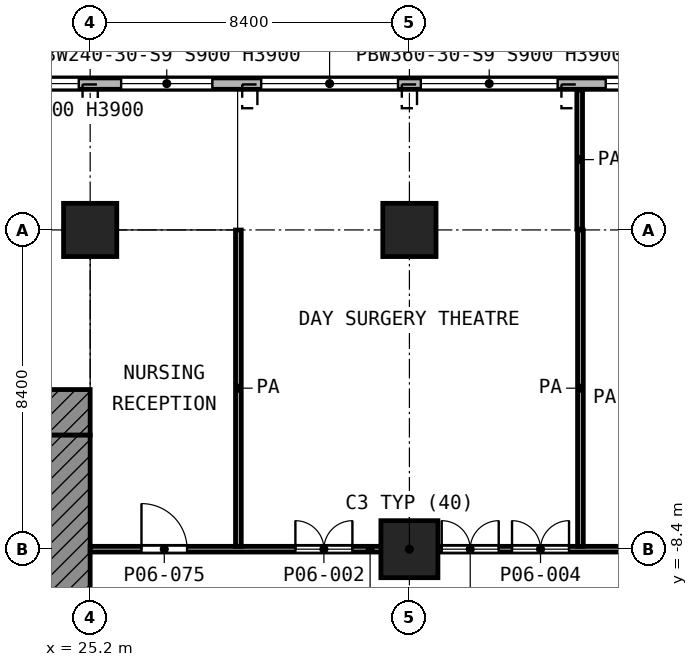
"""IFC4 building model, lengths in metres.
Left out: names, types, materials, properties, quantities, classifications, styles, units other than length and angle.
Written with IfcOpenShell. Run it as: python <this file> out.ifc"""

import sys

from ifc_helpers import new_model, si_unit, direction, frame, frame_2d, origin, origin_2d, place, context, subcontext, project, spatial, rectangle, extrude, element, fill, save


model = new_model("IFC4")
c1 = context("Model", 3, precision=1e-05, world=origin(), true_north=direction((0.0, 1.0)))
c2 = subcontext(c1, "Body", "Model", "MODEL_VIEW")
j1 = project(units=[si_unit("LENGTHUNIT", "METRE"), si_unit("PLANEANGLEUNIT", "RADIAN")], contexts=[c1])
p1 = place(None, origin())
s1 = spatial("IfcSite", under=j1, at=p1, CompositionType="ELEMENT")
p2 = place(p1, origin())
s2 = spatial("IfcBuilding", under=s1, at=p2, CompositionType="ELEMENT")
p3 = place(p2, frame((0.0, 0.0, 29.0)))
s3 = spatial("IfcBuildingStorey", under=s2, at=p3, CompositionType="ELEMENT", Elevation=29.0)
for number, where, z_axis, x_axis in (
    (1, (25.2, 0.0, 0.0), (0.0, 0.0, 1.0), (1.0, 0.0, 0.0)),
    (2, (33.6, 0.0, 0.0), (0.0, 0.0, 1.0), (1.0, 0.0, 0.0)),
):
    element("IfcColumn", number, at=place(p3, frame(where, z_axis=z_axis, x_axis=x_axis)), inside=s3, PredefinedType="COLUMN", context=c2, shape_type="SweptSolid", body=[
        extrude(rectangle(XDim=1.4, YDim=1.4, at=origin_2d()), origin(), (0.0, 0.0, 1.0), 5.2),
    ])
p4 = place(p3, frame((33.6, -8.4, 0.0), z_axis=(0.0, 0.0, 1.0), x_axis=(1.0, 0.0, 0.0)))
e3 = element("IfcColumn", 3, at=p4, inside=s3, PredefinedType="COLUMN", context=c2, shape_type="SweptSolid", body=[
    extrude(rectangle(XDim=1.5, YDim=1.5, at=origin_2d()), origin(), (0.0, 0.0, 1.0), 5.2),
])
p5 = place(p3, frame((90.338, 3.85, 0.0), z_axis=(0.0, 0.0, 1.0), x_axis=(-1.0, 0.0, 0.0)))
e4 = element("IfcWall", 4, at=p5, inside=s3, PredefinedType="SOLIDWALL", context=c2, shape_type="SweptSolid", body=[
    extrude(rectangle(XDim=88.276, YDim=0.3, at=frame_2d((44.138, 0.0))), origin(), (0.0, 0.0, 1.0), 4.7),
])
p6 = place(p5, frame((0.438, 0.0, 0.9)))
e5 = element("IfcOpeningElement", 5, at=p6, cuts=e4, PredefinedType="OPENING", context=c2, shape_type="SweptSolid", body=[
    extrude(rectangle(XDim=1.2, YDim=3.0, at=frame_2d((0.6, 1.5))), frame((0.0, 0.16, 0.0), z_axis=(0.0, -1.0, 0.0), x_axis=(1.0, 0.0, 0.0)), (0.0, 0.0, 1.0), 0.32),
])
p7 = place(p5, frame((2.438, 0.0, 0.9)))
e6 = element("IfcOpeningElement", 6, at=p7, cuts=e4, PredefinedType="OPENING", context=c2, shape_type="SweptSolid", body=[
    extrude(rectangle(XDim=3.6, YDim=3.0, at=frame_2d((1.8, 1.5))), frame((0.0, 0.16, 0.0), z_axis=(0.0, -1.0, 0.0), x_axis=(1.0, 0.0, 0.0)), (0.0, 0.0, 1.0), 0.32),
])
p8 = place(p5, frame((6.638, 0.0, 0.9)))
e7 = element("IfcOpeningElement", 7, at=p8, cuts=e4, PredefinedType="OPENING", context=c2, shape_type="SweptSolid", body=[
    extrude(rectangle(XDim=3.6, YDim=3.0, at=frame_2d((1.8, 1.5))), frame((0.0, 0.16, 0.0), z_axis=(0.0, -1.0, 0.0), x_axis=(1.0, 0.0, 0.0)), (0.0, 0.0, 1.0), 0.32),
])
p9 = place(p5, frame((10.838, 0.0, 0.9)))
e8 = element("IfcOpeningElement", 8, at=p9, cuts=e4, PredefinedType="OPENING", context=c2, shape_type="SweptSolid", body=[
    extrude(rectangle(XDim=3.6, YDim=3.0, at=frame_2d((1.8, 1.5))), frame((0.0, 0.16, 0.0), z_axis=(0.0, -1.0, 0.0), x_axis=(1.0, 0.0, 0.0)), (0.0, 0.0, 1.0), 0.32),
])
p10 = place(p5, frame((15.038, 0.0, 0.9)))
e9 = element("IfcOpeningElement", 9, at=p10, cuts=e4, PredefinedType="OPENING", context=c2, shape_type="SweptSolid", body=[
    extrude(rectangle(XDim=3.6, YDim=3.0, at=frame_2d((1.8, 1.5))), frame((0.0, 0.16, 0.0), z_axis=(0.0, -1.0, 0.0), x_axis=(1.0, 0.0, 0.0)), (0.0, 0.0, 1.0), 0.32),
])
p11 = place(p5, frame((19.923, 0.0, 0.9)))
e10 = element("IfcOpeningElement", 10, at=p11, cuts=e4, PredefinedType="OPENING", context=c2, shape_type="SweptSolid", body=[
    extrude(rectangle(XDim=2.4, YDim=3.0, at=frame_2d((1.2, 1.5))), frame((0.0, 0.16, 0.0), z_axis=(0.0, -1.0, 0.0), x_axis=(1.0, 0.0, 0.0)), (0.0, 0.0, 1.0), 0.32),
])
p12 = place(p5, frame((23.438, 0.0, 0.9)))
e11 = element("IfcOpeningElement", 11, at=p12, cuts=e4, PredefinedType="OPENING", context=c2, shape_type="SweptSolid", body=[
    extrude(rectangle(XDim=3.6, YDim=3.0, at=frame_2d((1.8, 1.5))), frame((0.0, 0.16, 0.0), z_axis=(0.0, -1.0, 0.0), x_axis=(1.0, 0.0, 0.0)), (0.0, 0.0, 1.0), 0.32),
])
p13 = place(p5, frame((27.638, 0.0, 0.9)))
e12 = element("IfcOpeningElement", 12, at=p13, cuts=e4, PredefinedType="OPENING", context=c2, shape_type="SweptSolid", body=[
    extrude(rectangle(XDim=3.6, YDim=3.0, at=frame_2d((1.8, 1.5))), frame((0.0, 0.16, 0.0), z_axis=(0.0, -1.0, 0.0), x_axis=(1.0, 0.0, 0.0)), (0.0, 0.0, 1.0), 0.32),
])
p14 = place(p5, frame((31.838, 0.0, 0.9)))
e13 = element("IfcOpeningElement", 13, at=p14, cuts=e4, PredefinedType="OPENING", context=c2, shape_type="SweptSolid", body=[
    extrude(rectangle(XDim=3.6, YDim=3.0, at=frame_2d((1.8, 1.5))), frame((0.0, 0.16, 0.0), z_axis=(0.0, -1.0, 0.0), x_axis=(1.0, 0.0, 0.0)), (0.0, 0.0, 1.0), 0.32),
])
p15 = place(p5, frame((36.038, 0.0, 0.9)))
e14 = element("IfcOpeningElement", 14, at=p15, cuts=e4, PredefinedType="OPENING", context=c2, shape_type="SweptSolid", body=[
    extrude(rectangle(XDim=3.6, YDim=3.0, at=frame_2d((1.8, 1.5))), frame((0.0, 0.16, 0.0), z_axis=(0.0, -1.0, 0.0), x_axis=(1.0, 0.0, 0.0)), (0.0, 0.0, 1.0), 0.32),
])
p16 = place(p5, frame((40.238, 0.0, 0.9)))
e15 = element("IfcOpeningElement", 15, at=p16, cuts=e4, PredefinedType="OPENING", context=c2, shape_type="SweptSolid", body=[
    extrude(rectangle(XDim=3.6, YDim=3.0, at=frame_2d((1.8, 1.5))), frame((0.0, 0.16, 0.0), z_axis=(0.0, -1.0, 0.0), x_axis=(1.0, 0.0, 0.0)), (0.0, 0.0, 1.0), 0.32),
])
p17 = place(p5, frame((44.773, 0.0, 0.9)))
e16 = element("IfcOpeningElement", 16, at=p17, cuts=e4, PredefinedType="OPENING", context=c2, shape_type="SweptSolid", body=[
    extrude(rectangle(XDim=2.4, YDim=3.0, at=frame_2d((1.2, 1.5))), frame((0.0, 0.16, 0.0), z_axis=(0.0, -1.0, 0.0), x_axis=(1.0, 0.0, 0.0)), (0.0, 0.0, 1.0), 0.32),
])
p18 = place(p5, frame((49.173, 0.0, 0.9)))
e17 = element("IfcOpeningElement", 17, at=p18, cuts=e4, PredefinedType="OPENING", context=c2, shape_type="SweptSolid", body=[
    extrude(rectangle(XDim=2.4, YDim=3.0, at=frame_2d((1.2, 1.5))), frame((0.0, 0.16, 0.0), z_axis=(0.0, -1.0, 0.0), x_axis=(1.0, 0.0, 0.0)), (0.0, 0.0, 1.0), 0.32),
])
p19 = place(p5, frame((52.838, 0.0, 0.9)))
e18 = element("IfcOpeningElement", 18, at=p19, cuts=e4, PredefinedType="OPENING", context=c2, shape_type="SweptSolid", body=[
    extrude(rectangle(XDim=3.6, YDim=3.0, at=frame_2d((1.8, 1.5))), frame((0.0, 0.16, 0.0), z_axis=(0.0, -1.0, 0.0), x_axis=(1.0, 0.0, 0.0)), (0.0, 0.0, 1.0), 0.32),
])
p20 = place(p5, frame((57.038, 0.0, 0.9)))
e19 = element("IfcOpeningElement", 19, at=p20, cuts=e4, PredefinedType="OPENING", context=c2, shape_type="SweptSolid", body=[
    extrude(rectangle(XDim=3.6, YDim=3.0, at=frame_2d((1.8, 1.5))), frame((0.0, 0.16, 0.0), z_axis=(0.0, -1.0, 0.0), x_axis=(1.0, 0.0, 0.0)), (0.0, 0.0, 1.0), 0.32),
])
p21 = place(p5, frame((61.923, 0.0, 0.9)))
e20 = element("IfcOpeningElement", 20, at=p21, cuts=e4, PredefinedType="OPENING", context=c2, shape_type="SweptSolid", body=[
    extrude(rectangle(XDim=2.4, YDim=3.0, at=frame_2d((1.2, 1.5))), frame((0.0, 0.16, 0.0), z_axis=(0.0, -1.0, 0.0), x_axis=(1.0, 0.0, 0.0)), (0.0, 0.0, 1.0), 0.32),
])
p22 = place(p5, frame((65.438, 0.0, 0.9)))
e21 = element("IfcOpeningElement", 21, at=p22, cuts=e4, PredefinedType="OPENING", context=c2, shape_type="SweptSolid", body=[
    extrude(rectangle(XDim=3.6, YDim=3.0, at=frame_2d((1.8, 1.5))), frame((0.0, 0.16, 0.0), z_axis=(0.0, -1.0, 0.0), x_axis=(1.0, 0.0, 0.0)), (0.0, 0.0, 1.0), 0.32),
])
p23 = place(p5, frame((69.638, 0.0, 0.9)))
e22 = element("IfcOpeningElement", 22, at=p23, cuts=e4, PredefinedType="OPENING", context=c2, shape_type="SweptSolid", body=[
    extrude(rectangle(XDim=3.6, YDim=3.0, at=frame_2d((1.8, 1.5))), frame((0.0, 0.16, 0.0), z_axis=(0.0, -1.0, 0.0), x_axis=(1.0, 0.0, 0.0)), (0.0, 0.0, 1.0), 0.32),
])
p24 = place(p5, frame((73.838, 0.0, 0.9)))
e23 = element("IfcOpeningElement", 23, at=p24, cuts=e4, PredefinedType="OPENING", context=c2, shape_type="SweptSolid", body=[
    extrude(rectangle(XDim=3.6, YDim=3.0, at=frame_2d((1.8, 1.5))), frame((0.0, 0.16, 0.0), z_axis=(0.0, -1.0, 0.0), x_axis=(1.0, 0.0, 0.0)), (0.0, 0.0, 1.0), 0.32),
])
p25 = place(p5, frame((78.038, 0.0, 0.9)))
e24 = element("IfcOpeningElement", 24, at=p25, cuts=e4, PredefinedType="OPENING", context=c2, shape_type="SweptSolid", body=[
    extrude(rectangle(XDim=3.6, YDim=3.0, at=frame_2d((1.8, 1.5))), frame((0.0, 0.16, 0.0), z_axis=(0.0, -1.0, 0.0), x_axis=(1.0, 0.0, 0.0)), (0.0, 0.0, 1.0), 0.32),
])
p26 = place(p5, frame((82.238, 0.0, 0.9)))
e25 = element("IfcOpeningElement", 25, at=p26, cuts=e4, PredefinedType="OPENING", context=c2, shape_type="SweptSolid", body=[
    extrude(rectangle(XDim=3.6, YDim=3.0, at=frame_2d((1.8, 1.5))), frame((0.0, 0.16, 0.0), z_axis=(0.0, -1.0, 0.0), x_axis=(1.0, 0.0, 0.0)), (0.0, 0.0, 1.0), 0.32),
])
p27 = place(p5, frame((86.638, 0.0, 0.9)))
e26 = element("IfcOpeningElement", 26, at=p27, cuts=e4, PredefinedType="OPENING", context=c2, shape_type="SweptSolid", body=[
    extrude(rectangle(XDim=1.2, YDim=3.0, at=frame_2d((0.6, 1.5))), frame((0.0, 0.16, 0.0), z_axis=(0.0, -1.0, 0.0), x_axis=(1.0, 0.0, 0.0)), (0.0, 0.0, 1.0), 0.32),
])
p28 = place(p3, frame((4.2, -4.8, 0.0), z_axis=(0.0, 0.0, 1.0), x_axis=(1.0, 0.0, 0.0)))
e27 = element("IfcWall", 27, at=p28, inside=s3, PredefinedType="SHEAR", context=c2, shape_type="SweptSolid", body=[
    extrude(rectangle(XDim=21.0, YDim=1.2, at=frame_2d((10.5, 0.0))), origin(), (0.0, 0.0, 1.0), 4.7),
])
p29 = place(p28, frame((1.95, 0.0, 0.0)))
e28 = element("IfcOpeningElement", 28, at=p29, cuts=e27, PredefinedType="OPENING", context=c2, shape_type="SweptSolid", body=[
    extrude(rectangle(XDim=1.1, YDim=2.1, at=frame_2d((0.55, 1.05))), frame((0.0, 0.61, 0.0), z_axis=(0.0, -1.0, 0.0), x_axis=(1.0, 0.0, 0.0)), (0.0, 0.0, 1.0), 1.22),
])
p30 = place(p28, frame((17.95, 0.0, 0.0)))
e29 = element("IfcOpeningElement", 29, at=p30, cuts=e27, PredefinedType="OPENING", context=c2, shape_type="SweptSolid", body=[
    extrude(rectangle(XDim=1.1, YDim=2.1, at=frame_2d((0.55, 1.05))), frame((0.0, 0.61, 0.0), z_axis=(0.0, -1.0, 0.0), x_axis=(1.0, 0.0, 0.0)), (0.0, 0.0, 1.0), 1.22),
])
p31 = place(p3, frame((24.6, -24.0, 0.0), z_axis=(0.0, 0.0, 1.0), x_axis=(0.0, 1.0, 0.0)))
e30 = element("IfcWall", 30, at=p31, inside=s3, PredefinedType="SHEAR", context=c2, shape_type="SweptSolid", body=[
    extrude(rectangle(XDim=18.6, YDim=1.2, at=frame_2d((9.3, 0.0))), origin(), (0.0, 0.0, 1.0), 4.7),
])
p32 = place(p31, frame((10.5, 0.0, 0.0)))
e31 = element("IfcOpeningElement", 31, at=p32, cuts=e30, PredefinedType="OPENING", context=c2, shape_type="SweptSolid", body=[
    extrude(rectangle(XDim=1.8, YDim=2.1, at=frame_2d((0.9, 1.05))), frame((0.0, 0.61, 0.0), z_axis=(0.0, -1.0, 0.0), x_axis=(1.0, 0.0, 0.0)), (0.0, 0.0, 1.0), 1.22),
])
p33 = place(p3, frame((25.2, -8.4, 0.0), z_axis=(0.0, 0.0, 1.0), x_axis=(1.0, 0.0, 0.0)))
e32 = element("IfcWall", 32, at=p33, inside=s3, PredefinedType="PARTITIONING", context=c2, shape_type="SweptSolid", body=[
    extrude(rectangle(XDim=14.732, YDim=0.15, at=frame_2d((7.366, 0.0))), origin(), (0.0, 0.0, 1.0), 4.7),
])
p34 = place(p33, frame((1.35, 0.0, 0.0)))
e33 = element("IfcOpeningElement", 33, at=p34, cuts=e32, PredefinedType="OPENING", context=c2, shape_type="SweptSolid", body=[
    extrude(rectangle(XDim=1.2, YDim=2.1, at=frame_2d((0.6, 1.05))), frame((0.0, 0.085, 0.0), z_axis=(0.0, -1.0, 0.0), x_axis=(1.0, 0.0, 0.0)), (0.0, 0.0, 1.0), 0.17),
])
p35 = place(p33, frame((5.4, 0.0, 0.0)))
e34 = element("IfcOpeningElement", 34, at=p35, cuts=e32, PredefinedType="OPENING", context=c2, shape_type="SweptSolid", body=[
    extrude(rectangle(XDim=1.5, YDim=2.1, at=frame_2d((0.75, 1.05))), frame((0.0, 0.085, 0.0), z_axis=(0.0, -1.0, 0.0), x_axis=(1.0, 0.0, 0.0)), (0.0, 0.0, 1.0), 0.17),
])
p36 = place(p33, frame((9.25, 0.0, 0.0)))
e35 = element("IfcOpeningElement", 35, at=p36, cuts=e32, PredefinedType="OPENING", context=c2, shape_type="SweptSolid", body=[
    extrude(rectangle(XDim=1.5, YDim=2.1, at=frame_2d((0.75, 1.05))), frame((0.0, 0.085, 0.0), z_axis=(0.0, -1.0, 0.0), x_axis=(1.0, 0.0, 0.0)), (0.0, 0.0, 1.0), 0.17),
])
p37 = place(p33, frame((11.1, 0.0, 0.0)))
e36 = element("IfcOpeningElement", 36, at=p37, cuts=e32, PredefinedType="OPENING", context=c2, shape_type="SweptSolid", body=[
    extrude(rectangle(XDim=1.5, YDim=2.1, at=frame_2d((0.75, 1.05))), frame((0.0, 0.085, 0.0), z_axis=(0.0, -1.0, 0.0), x_axis=(1.0, 0.0, 0.0)), (0.0, 0.0, 1.0), 0.17),
])
p38 = place(p3, frame((29.1, -8.325, 0.0), z_axis=(0.0, 0.0, 1.0), x_axis=(0.0, 1.0, 0.0)))
e37 = element("IfcWall", 37, at=p38, inside=s3, PredefinedType="PARTITIONING", context=c2, shape_type="SweptSolid", body=[
    extrude(rectangle(XDim=8.323, YDim=0.15, at=frame_2d((4.162, 0.0))), origin(), (0.0, 0.0, 1.0), 4.7),
])
p39 = place(p3, frame((38.08, 0.02, 0.0), z_axis=(0.0, 0.0, 1.0), x_axis=(0.0, 1.0, 0.0)))
e38 = element("IfcWall", 38, at=p39, inside=s3, PredefinedType="PARTITIONING", context=c2, shape_type="SweptSolid", body=[
    extrude(rectangle(XDim=3.66, YDim=0.15, at=frame_2d((1.83, 0.0))), origin(), (0.0, 0.0, 1.0), 4.7),
])
p40 = place(p3, frame((38.1, -8.325, 0.0), z_axis=(0.0, 0.0, 1.0), x_axis=(0.0, 1.0, 0.0)))
e39 = element("IfcWall", 39, at=p40, inside=s3, PredefinedType="PARTITIONING", context=c2, shape_type="SweptSolid", body=[
    extrude(rectangle(XDim=8.322, YDim=0.15, at=frame_2d((4.161, 0.0))), origin(), (0.0, 0.0, 1.0), 4.7),
])
p41 = place(p18, origin())
e40 = element("IfcWindow", 40, at=p41, inside=s3, PartitioningType="SINGLE_PANEL", PredefinedType="WINDOW", context=c2, shape_type="SweptSolid", body=[
    extrude(rectangle(XDim=2.4, YDim=3.0, at=frame_2d((1.2, 1.5))), frame((0.0, 0.03, 0.0), z_axis=(0.0, -1.0, 0.0), x_axis=(1.0, 0.0, 0.0)), (0.0, 0.0, 1.0), 0.06),
])
fill(e17, e40)
p42 = place(p19, origin())
e41 = element("IfcWindow", 41, at=p42, inside=s3, PartitioningType="SINGLE_PANEL", PredefinedType="WINDOW", context=c2, shape_type="SweptSolid", body=[
    extrude(rectangle(XDim=3.6, YDim=3.0, at=frame_2d((1.8, 1.5))), frame((0.0, 0.03, 0.0), z_axis=(0.0, -1.0, 0.0), x_axis=(1.0, 0.0, 0.0)), (0.0, 0.0, 1.0), 0.06),
])
fill(e18, e41)
p43 = place(p20, origin())
e42 = element("IfcWindow", 42, at=p43, inside=s3, PartitioningType="SINGLE_PANEL", PredefinedType="WINDOW", context=c2, shape_type="SweptSolid", body=[
    extrude(rectangle(XDim=3.6, YDim=3.0, at=frame_2d((1.8, 1.5))), frame((0.0, 0.03, 0.0), z_axis=(0.0, -1.0, 0.0), x_axis=(1.0, 0.0, 0.0)), (0.0, 0.0, 1.0), 0.06),
])
fill(e19, e42)
p44 = place(p21, origin())
e43 = element("IfcWindow", 43, at=p44, inside=s3, PartitioningType="SINGLE_PANEL", PredefinedType="WINDOW", context=c2, shape_type="SweptSolid", body=[
    extrude(rectangle(XDim=2.4, YDim=3.0, at=frame_2d((1.2, 1.5))), frame((0.0, 0.03, 0.0), z_axis=(0.0, -1.0, 0.0), x_axis=(1.0, 0.0, 0.0)), (0.0, 0.0, 1.0), 0.06),
])
fill(e20, e43)
p45 = place(p22, origin())
e44 = element("IfcWindow", 44, at=p45, inside=s3, PartitioningType="SINGLE_PANEL", PredefinedType="WINDOW", context=c2, shape_type="SweptSolid", body=[
    extrude(rectangle(XDim=3.6, YDim=3.0, at=frame_2d((1.8, 1.5))), frame((0.0, 0.03, 0.0), z_axis=(0.0, -1.0, 0.0), x_axis=(1.0, 0.0, 0.0)), (0.0, 0.0, 1.0), 0.06),
])
fill(e21, e44)
p46 = place(p34, origin())
e45 = element("IfcDoor", 45, at=p46, inside=s3, OperationType="SINGLE_SWING_LEFT", PredefinedType="DOOR", context=c2, shape_type="SweptSolid", body=[
    extrude(rectangle(XDim=1.2, YDim=2.1, at=frame_2d((0.6, 1.05))), frame((0.0, 0.025, 0.0), z_axis=(0.0, -1.0, 0.0), x_axis=(1.0, 0.0, 0.0)), (0.0, 0.0, 1.0), 0.05),
])
fill(e33, e45)
p47 = place(p35, origin())
e46 = element("IfcDoor", 46, at=p47, inside=s3, OperationType="DOUBLE_DOOR_SINGLE_SWING", PredefinedType="DOOR", context=c2, shape_type="SweptSolid", body=[
    extrude(rectangle(XDim=1.5, YDim=2.1, at=frame_2d((0.75, 1.05))), frame((0.0, 0.025, 0.0), z_axis=(0.0, -1.0, 0.0), x_axis=(1.0, 0.0, 0.0)), (0.0, 0.0, 1.0), 0.05),
])
fill(e34, e46)
p48 = place(p36, origin())
e47 = element("IfcDoor", 47, at=p48, inside=s3, OperationType="DOUBLE_DOOR_SINGLE_SWING", PredefinedType="DOOR", context=c2, shape_type="SweptSolid", body=[
    extrude(rectangle(XDim=1.5, YDim=2.1, at=frame_2d((0.75, 1.05))), frame((0.0, 0.025, 0.0), z_axis=(0.0, -1.0, 0.0), x_axis=(1.0, 0.0, 0.0)), (0.0, 0.0, 1.0), 0.05),
])
fill(e35, e47)
p49 = place(p37, origin())
e48 = element("IfcDoor", 48, at=p49, inside=s3, OperationType="DOUBLE_DOOR_SINGLE_SWING", PredefinedType="DOOR", context=c2, shape_type="SweptSolid", body=[
    extrude(rectangle(XDim=1.5, YDim=2.1, at=frame_2d((0.75, 1.05))), frame((0.0, 0.025, 0.0), z_axis=(0.0, -1.0, 0.0), x_axis=(1.0, 0.0, 0.0)), (0.0, 0.0, 1.0), 0.05),
])
fill(e36, e48)
save(model, sys.argv[1])
